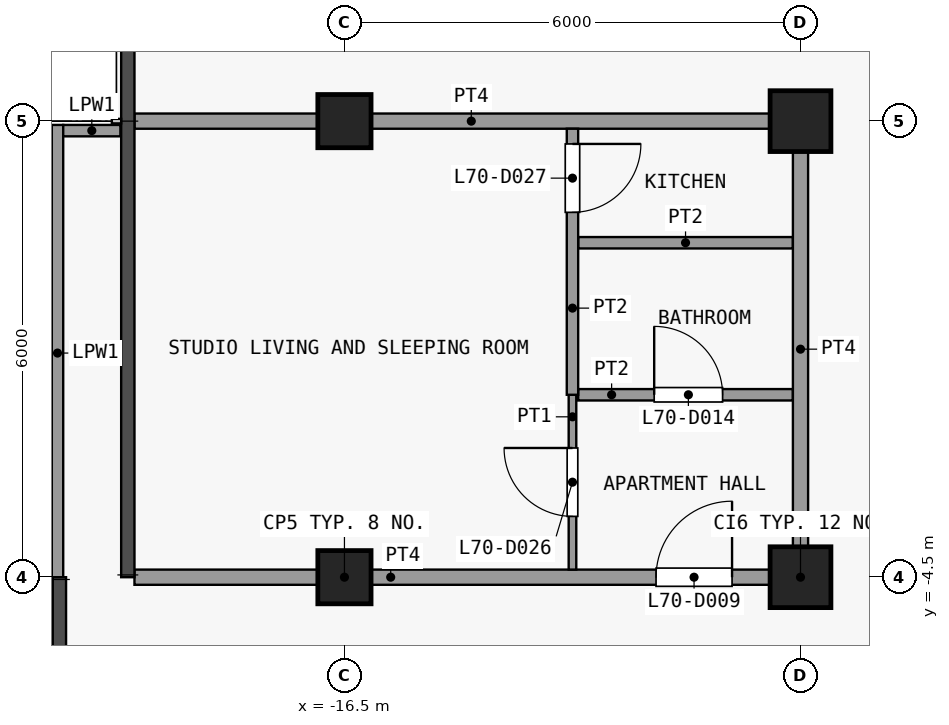
"""IFC4 building model, lengths in metres.
Left out: names, types, materials, properties, quantities, classifications, styles, units other than length and angle.
Written with IfcOpenShell. Run it as: python <this file> out.ifc"""

import sys

from ifc_helpers import new_model, si_unit, direction, frame, frame_2d, origin, origin_2d, place, context, subcontext, project, spatial, rectangle, extrude, element, fill, save


model = new_model("IFC4")
c1 = context("Model", 3, precision=1e-05, world=origin(), true_north=direction((0.0, 1.0)))
c2 = subcontext(c1, "Body", "Model", "MODEL_VIEW")
j1 = project(units=[si_unit("LENGTHUNIT", "METRE"), si_unit("PLANEANGLEUNIT", "RADIAN")], contexts=[c1])
p1 = place(None, origin())
s1 = spatial("IfcSite", under=j1, at=p1, CompositionType="ELEMENT")
p2 = place(p1, origin())
s2 = spatial("IfcBuilding", under=s1, at=p2, CompositionType="ELEMENT")
p3 = place(p2, frame((0.0, 0.0, 277.1)))
s3 = spatial("IfcBuildingStorey", under=s2, at=p3, CompositionType="ELEMENT", Elevation=277.1)
for number, where, z_axis, x_axis in (
    (1, (-16.5, -4.5, 0.0), (0.0, 0.0, 1.0), (1.0, 0.0, 0.0)),
    (2, (-16.5, 1.5, 0.0), (0.0, 0.0, 1.0), (1.0, 0.0, 0.0)),
):
    element("IfcColumn", number, at=place(p3, frame(where, z_axis=z_axis, x_axis=x_axis)), inside=s3, PredefinedType="COLUMN", context=c2, shape_type="SweptSolid", body=[
        extrude(rectangle(XDim=0.7, YDim=0.7, at=origin_2d()), origin(), (0.0, 0.0, 1.0), 3.6),
    ])
for number, where, z_axis, x_axis in (
    (3, (-10.5, -4.5, 0.0), (0.0, 0.0, 1.0), (1.0, 0.0, 0.0)),
    (4, (-10.5, 1.5, 0.0), (0.0, 0.0, 1.0), (1.0, 0.0, 0.0)),
):
    element("IfcColumn", number, at=place(p3, frame(where, z_axis=z_axis, x_axis=x_axis)), inside=s3, PredefinedType="COLUMN", context=c2, shape_type="SweptSolid", body=[
        extrude(rectangle(XDim=0.8, YDim=0.8, at=origin_2d()), origin(), (0.0, 0.0, 1.0), 3.6),
    ])
p4 = place(p3, frame((-20.275, -4.552, 0.0), z_axis=(0.0, 0.0, 1.0), x_axis=(0.0, 1.0, 0.0)))
e5 = element("IfcWall", 5, at=p4, inside=s3, PredefinedType="PARAPET", context=c2, shape_type="SweptSolid", body=[
    extrude(rectangle(XDim=6.002, YDim=0.15, at=frame_2d((3.001, 0.0))), origin(), (0.0, 0.0, 1.0), 1.15),
])
p5 = place(p3, frame((-20.2, 1.375, 0.0), z_axis=(0.0, 0.0, 1.0), x_axis=(1.0, 0.0, 0.0)))
e6 = element("IfcWall", 6, at=p5, inside=s3, PredefinedType="PARAPET", context=c2, shape_type="SweptSolid", body=[
    extrude(rectangle(XDim=0.752, YDim=0.15, at=frame_2d((0.376, 0.0))), origin(), (0.0, 0.0, 1.0), 1.15),
])
p6 = place(p3, frame((-19.262, -4.5, 0.0), z_axis=(0.0, 0.0, 1.0), x_axis=(1.0, 0.0, 0.0)))
e7 = element("IfcWall", 7, at=p6, inside=s3, PredefinedType="PARTITIONING", context=c2, shape_type="SweptSolid", body=[
    extrude(rectangle(XDim=8.863, YDim=0.2, at=frame_2d((4.431, 0.0))), origin(), (0.0, 0.0, 1.0), 3.3),
])
p7 = place(p6, frame((6.862, 0.0, 0.0)))
e8 = element("IfcOpeningElement", 8, at=p7, cuts=e7, PredefinedType="OPENING", context=c2, shape_type="SweptSolid", body=[
    extrude(rectangle(XDim=1.0, YDim=2.1, at=frame_2d((0.5, 1.05))), frame((0.0, 0.11, 0.0), z_axis=(0.0, -1.0, 0.0), x_axis=(1.0, 0.0, 0.0)), (0.0, 0.0, 1.0), 0.22),
])
p8 = place(p3, frame((-13.425, -2.1, 0.0), z_axis=(0.0, 0.0, 1.0), x_axis=(1.0, 0.0, 0.0)))
e9 = element("IfcWall", 9, at=p8, inside=s3, PredefinedType="PARTITIONING", context=c2, shape_type="SweptSolid", body=[
    extrude(rectangle(XDim=2.825, YDim=0.15, at=frame_2d((1.413, 0.0))), origin(), (0.0, 0.0, 1.0), 3.3),
])
p9 = place(p8, frame((1.0, 0.0, 0.0)))
e10 = element("IfcOpeningElement", 10, at=p9, cuts=e9, PredefinedType="OPENING", context=c2, shape_type="SweptSolid", body=[
    extrude(rectangle(XDim=0.9, YDim=2.1, at=frame_2d((0.45, 1.05))), frame((0.0, 0.085, 0.0), z_axis=(0.0, -1.0, 0.0), x_axis=(1.0, 0.0, 0.0)), (0.0, 0.0, 1.0), 0.17),
])
p10 = place(p3, frame((-13.425, -0.1, 0.0), z_axis=(0.0, 0.0, 1.0), x_axis=(1.0, 0.0, 0.0)))
e11 = element("IfcWall", 11, at=p10, inside=s3, PredefinedType="PARTITIONING", context=c2, shape_type="SweptSolid", body=[
    extrude(rectangle(XDim=2.825, YDim=0.15, at=frame_2d((1.413, 0.0))), origin(), (0.0, 0.0, 1.0), 3.3),
])
p11 = place(p3, frame((-19.262, 1.5, 0.0), z_axis=(0.0, 0.0, 1.0), x_axis=(1.0, 0.0, 0.0)))
e12 = element("IfcWall", 12, at=p11, inside=s3, PredefinedType="PARTITIONING", context=c2, shape_type="SweptSolid", body=[
    extrude(rectangle(XDim=8.863, YDim=0.2, at=frame_2d((4.431, 0.0))), origin(), (0.0, 0.0, 1.0), 3.3),
])
p12 = place(p3, frame((-13.5, -4.4, 0.0), z_axis=(0.0, 0.0, 1.0), x_axis=(0.0, 1.0, 0.0)))
e13 = element("IfcWall", 13, at=p12, inside=s3, PredefinedType="PARTITIONING", context=c2, shape_type="SweptSolid", body=[
    extrude(rectangle(XDim=2.3, YDim=0.1, at=frame_2d((1.15, 0.0))), origin(), (0.0, 0.0, 1.0), 3.3),
])
p13 = place(p12, frame((0.7, 0.0, 0.0)))
e14 = element("IfcOpeningElement", 14, at=p13, cuts=e13, PredefinedType="OPENING", context=c2, shape_type="SweptSolid", body=[
    extrude(rectangle(XDim=0.9, YDim=2.1, at=frame_2d((0.45, 1.05))), frame((0.0, 0.06, 0.0), z_axis=(0.0, -1.0, 0.0), x_axis=(1.0, 0.0, 0.0)), (0.0, 0.0, 1.0), 0.12),
])
p14 = place(p3, frame((-13.5, -2.1, 0.0), z_axis=(0.0, 0.0, 1.0), x_axis=(0.0, 1.0, 0.0)))
e15 = element("IfcWall", 15, at=p14, inside=s3, PredefinedType="PARTITIONING", context=c2, shape_type="SweptSolid", body=[
    extrude(rectangle(XDim=3.5, YDim=0.15, at=frame_2d((1.75, 0.0))), origin(), (0.0, 0.0, 1.0), 3.3),
])
p15 = place(p14, frame((2.4, 0.0, 0.0)))
e16 = element("IfcOpeningElement", 16, at=p15, cuts=e15, PredefinedType="OPENING", context=c2, shape_type="SweptSolid", body=[
    extrude(rectangle(XDim=0.9, YDim=2.1, at=frame_2d((0.45, 1.05))), frame((0.0, 0.085, 0.0), z_axis=(0.0, -1.0, 0.0), x_axis=(1.0, 0.0, 0.0)), (0.0, 0.0, 1.0), 0.17),
])
p16 = place(p3, frame((-10.5, -4.4, 0.0), z_axis=(0.0, 0.0, 1.0), x_axis=(0.0, 1.0, 0.0)))
e17 = element("IfcWall", 17, at=p16, inside=s3, PredefinedType="PARTITIONING", context=c2, shape_type="SweptSolid", body=[
    extrude(rectangle(XDim=5.8, YDim=0.2, at=frame_2d((2.9, 0.0))), origin(), (0.0, 0.0, 1.0), 3.3),
])
p17 = place(p7, origin())
e18 = element("IfcDoor", 18, at=p17, inside=s3, OperationType="SINGLE_SWING_LEFT", PredefinedType="DOOR", context=c2, shape_type="SweptSolid", body=[
    extrude(rectangle(XDim=1.0, YDim=2.1, at=frame_2d((0.5, 1.05))), frame((0.0, 0.025, 0.0), z_axis=(0.0, -1.0, 0.0), x_axis=(1.0, 0.0, 0.0)), (0.0, 0.0, 1.0), 0.05),
])
fill(e8, e18)
p18 = place(p9, origin())
e19 = element("IfcDoor", 19, at=p18, inside=s3, OperationType="SINGLE_SWING_RIGHT", PredefinedType="DOOR", context=c2, shape_type="SweptSolid", body=[
    extrude(rectangle(XDim=0.9, YDim=2.1, at=frame_2d((0.45, 1.05))), frame((0.0, 0.025, 0.0), z_axis=(0.0, -1.0, 0.0), x_axis=(1.0, 0.0, 0.0)), (0.0, 0.0, 1.0), 0.05),
])
fill(e10, e19)
p19 = place(p13, origin())
e20 = element("IfcDoor", 20, at=p19, inside=s3, OperationType="SINGLE_SWING_LEFT", PredefinedType="DOOR", context=c2, shape_type="SweptSolid", body=[
    extrude(rectangle(XDim=0.9, YDim=2.1, at=frame_2d((0.45, 1.05))), frame((0.0, 0.025, 0.0), z_axis=(0.0, -1.0, 0.0), x_axis=(1.0, 0.0, 0.0)), (0.0, 0.0, 1.0), 0.05),
])
fill(e14, e20)
p20 = place(p15, origin())
e21 = element("IfcDoor", 21, at=p20, inside=s3, OperationType="SINGLE_SWING_RIGHT", PredefinedType="DOOR", context=c2, shape_type="SweptSolid", body=[
    extrude(rectangle(XDim=0.9, YDim=2.1, at=frame_2d((0.45, 1.05))), frame((0.0, 0.025, 0.0), z_axis=(0.0, -1.0, 0.0), x_axis=(1.0, 0.0, 0.0)), (0.0, 0.0, 1.0), 0.05),
])
fill(e16, e21)
save(model, sys.argv[1])
